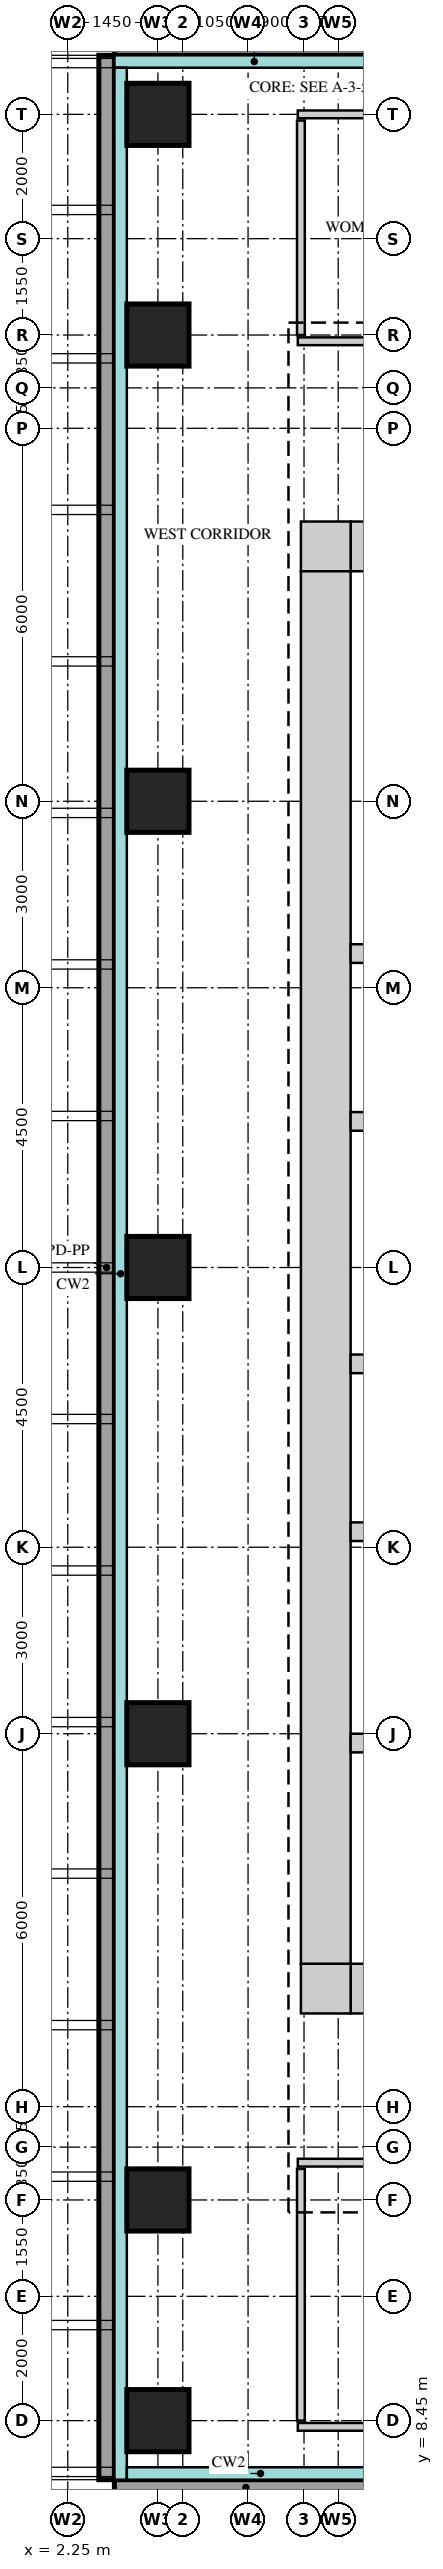
"""IFC4 building model, lengths in metres.
Left out: names, types, materials, properties, quantities, classifications, styles, units other than length and angle.
Written with IfcOpenShell. Run it as: python <this file> out.ifc"""

import sys

from ifc_helpers import new_model, si_unit, direction, frame, frame_2d, origin, origin_2d, place, context, subcontext, project, spatial, rectangle, extrude, source, transform, mapped, element, save


model = new_model("IFC4")
c1 = context("Model", 3, precision=1e-05, world=origin(), true_north=direction((0.0, 1.0)))
c2 = subcontext(c1, "Body", "Model", "MODEL_VIEW")
j1 = project(units=[si_unit("LENGTHUNIT", "METRE"), si_unit("PLANEANGLEUNIT", "RADIAN")], contexts=[c1])
p1 = place(None, origin())
s1 = spatial("IfcSite", under=j1, at=p1, CompositionType="ELEMENT")
p2 = place(p1, origin())
s2 = spatial("IfcBuilding", under=s1, at=p2, CompositionType="ELEMENT")
p3 = place(p2, frame((0.0, 0.0, 164.7)))
s3 = spatial("IfcBuildingStorey", under=s2, at=p3, CompositionType="ELEMENT", Elevation=164.7)
m1 = source(origin(), c2, "Body", "SweptSolid", [
    extrude(rectangle(XDim=13.4, YDim=0.8, at=frame_2d((6.7, 0.0))), origin(), (0.0, 0.0, 1.0), 3.75),
])
p4 = place(p3, frame((6.8, 38.6, 0.0), z_axis=(0.0, 0.0, 1.0), x_axis=(1.0, 0.0, 0.0)))
e1 = element("IfcWall", 1, at=p4, inside=s3, PredefinedType="SHEAR", context=c2, shape_type="MappedRepresentation", body=[
    mapped(m1, transform((0.0, 0.0, 0.0))),
])
m2 = source(origin(), c2, "Body", "SweptSolid", [
    extrude(rectangle(XDim=0.9, YDim=2.1, at=frame_2d((0.45, 1.05))), frame((0.0, 0.41, 0.0), z_axis=(0.0, -1.0, 0.0), x_axis=(1.0, 0.0, 0.0)), (0.0, 0.0, 1.0), 0.82),
])
p5 = place(p4, frame((2.9, 0.0, 0.0)))
e2 = element("IfcOpeningElement", 2, at=p5, cuts=e1, PredefinedType="OPENING", context=c2, shape_type="MappedRepresentation", body=[
    mapped(m2, transform((0.0, 0.0, 0.0))),
])
p6 = place(p4, frame((9.6, 0.0, 0.0)))
e3 = element("IfcOpeningElement", 3, at=p6, cuts=e1, PredefinedType="OPENING", context=c2, shape_type="MappedRepresentation", body=[
    mapped(m2, transform((0.0, 0.0, 0.0))),
])
m3 = source(origin(), c2, "Body", "SweptSolid", [
    extrude(rectangle(XDim=0.8, YDim=0.8, at=frame_2d((0.4, 0.0))), origin(), (0.0, 0.0, 1.0), 3.75),
])
p7 = place(p3, frame((6.0, 38.6, 0.0), z_axis=(0.0, 0.0, 1.0), x_axis=(1.0, 0.0, 0.0)))
e4 = element("IfcWall", 4, at=p7, inside=s3, PredefinedType="SHEAR", context=c2, shape_type="MappedRepresentation", body=[
    mapped(m3, transform((0.0, 0.0, 0.0))),
])
p8 = place(p3, frame((6.8, 15.4, 0.0), z_axis=(0.0, 0.0, 1.0), x_axis=(1.0, 0.0, 0.0)))
e5 = element("IfcWall", 5, at=p8, inside=s3, PredefinedType="SHEAR", context=c2, shape_type="MappedRepresentation", body=[
    mapped(m1, transform((0.0, 0.0, 0.0))),
])
m4 = source(origin(), c2, "Body", "SweptSolid", [
    extrude(rectangle(XDim=1.2, YDim=2.1, at=frame_2d((0.6, 1.05))), frame((0.0, 0.41, 0.0), z_axis=(0.0, -1.0, 0.0), x_axis=(1.0, 0.0, 0.0)), (0.0, 0.0, 1.0), 0.82),
])
p9 = place(p8, frame((5.4, 0.0, 0.0)))
e6 = element("IfcOpeningElement", 6, at=p9, cuts=e5, PredefinedType="OPENING", context=c2, shape_type="MappedRepresentation", body=[
    mapped(m4, transform((0.0, 0.0, 0.0))),
])
p10 = place(p8, frame((2.05, 0.0, 0.0)))
e7 = element("IfcOpeningElement", 7, at=p10, cuts=e5, PredefinedType="OPENING", context=c2, shape_type="MappedRepresentation", body=[
    mapped(m4, transform((0.0, 0.0, 0.0))),
])
m5 = source(origin(), c2, "Body", "SweptSolid", [
    extrude(rectangle(XDim=1.0, YDim=2.1, at=frame_2d((0.5, 1.05))), frame((0.0, 0.41, 0.0), z_axis=(0.0, -1.0, 0.0), x_axis=(1.0, 0.0, 0.0)), (0.0, 0.0, 1.0), 0.82),
])
p11 = place(p8, frame((7.9, 0.0, 0.0)))
e8 = element("IfcOpeningElement", 8, at=p11, cuts=e5, PredefinedType="OPENING", context=c2, shape_type="MappedRepresentation", body=[
    mapped(m5, transform((0.0, 0.0, 0.0))),
])
p12 = place(p3, frame((6.0, 15.4, 0.0), z_axis=(0.0, 0.0, 1.0), x_axis=(1.0, 0.0, 0.0)))
e9 = element("IfcWall", 9, at=p12, inside=s3, PredefinedType="SHEAR", context=c2, shape_type="MappedRepresentation", body=[
    mapped(m3, transform((0.0, 0.0, 0.0))),
])
m6 = source(origin(), c2, "Body", "SweptSolid", [
    extrude(rectangle(XDim=22.4, YDim=0.8, at=frame_2d((11.2, 0.0))), origin(), (0.0, 0.0, 1.0), 3.75),
])
p13 = place(p3, frame((6.4, 15.8, 0.0), z_axis=(0.0, 0.0, 1.0), x_axis=(0.0, 1.0, 0.0)))
e10 = element("IfcWall", 10, at=p13, inside=s3, PredefinedType="SHEAR", context=c2, shape_type="MappedRepresentation", body=[
    mapped(m6, transform((0.0, 0.0, 0.0))),
])
m7 = source(origin(), c2, "Body", "SweptSolid", [
    extrude(rectangle(XDim=13.4, YDim=0.3, at=frame_2d((6.7, 0.0))), origin(), (0.0, 0.0, 1.0), 3.75),
])
p14 = place(p3, frame((6.8, 22.75, 0.0), z_axis=(0.0, 0.0, 1.0), x_axis=(1.0, 0.0, 0.0)))
e11 = element("IfcWall", 11, at=p14, inside=s3, PredefinedType="STANDARD", context=c2, shape_type="MappedRepresentation", body=[
    mapped(m7, transform((0.0, 0.0, 0.0))),
])
m8 = source(origin(), c2, "Body", "SweptSolid", [
    extrude(rectangle(XDim=9.275, YDim=0.3, at=frame_2d((4.637, 0.0))), origin(), (0.0, 0.0, 1.0), 3.75),
])
p15 = place(p3, frame((6.8, 19.35, 0.0), z_axis=(0.0, 0.0, 1.0), x_axis=(1.0, 0.0, 0.0)))
e12 = element("IfcWall", 12, at=p15, inside=s3, PredefinedType="STANDARD", context=c2, shape_type="MappedRepresentation", body=[
    mapped(m8, transform((0.0, 0.0, 0.0))),
])
m9 = source(origin(), c2, "Body", "SweptSolid", [
    extrude(rectangle(XDim=1.2, YDim=2.1, at=frame_2d((0.6, 1.05))), frame((0.0, 0.16, 0.0), z_axis=(0.0, -1.0, 0.0), x_axis=(1.0, 0.0, 0.0)), (0.0, 0.0, 1.0), 0.32),
])
p16 = place(p15, frame((0.85, 0.0, 0.0)))
e13 = element("IfcOpeningElement", 13, at=p16, cuts=e12, PredefinedType="OPENING", context=c2, shape_type="MappedRepresentation", body=[
    mapped(m9, transform((0.0, 0.0, 0.0))),
])
p17 = place(p15, frame((3.2, 0.0, 0.0)))
e14 = element("IfcOpeningElement", 14, at=p17, cuts=e12, PredefinedType="OPENING", context=c2, shape_type="MappedRepresentation", body=[
    mapped(m9, transform((0.0, 0.0, 0.0))),
])
p18 = place(p15, frame((5.45, 0.0, 0.0)))
e15 = element("IfcOpeningElement", 15, at=p18, cuts=e12, PredefinedType="OPENING", context=c2, shape_type="MappedRepresentation", body=[
    mapped(m9, transform((0.0, 0.0, 0.0))),
])
p19 = place(p15, frame((7.6, 0.0, 0.0)))
e16 = element("IfcOpeningElement", 16, at=p19, cuts=e12, PredefinedType="OPENING", context=c2, shape_type="MappedRepresentation", body=[
    mapped(m9, transform((0.0, 0.0, 0.0))),
])
p20 = place(p3, frame((6.8, 32.05, 0.0), z_axis=(0.0, 0.0, 1.0), x_axis=(1.0, 0.0, 0.0)))
e17 = element("IfcWall", 17, at=p20, inside=s3, PredefinedType="STANDARD", context=c2, shape_type="MappedRepresentation", body=[
    mapped(m7, transform((0.0, 0.0, 0.0))),
])
p21 = place(p3, frame((6.8, 29.35, 0.0), z_axis=(0.0, 0.0, 1.0), x_axis=(1.0, 0.0, 0.0)))
e18 = element("IfcWall", 18, at=p21, inside=s3, PredefinedType="STANDARD", context=c2, shape_type="MappedRepresentation", body=[
    mapped(m7, transform((0.0, 0.0, 0.0))),
])
p22 = place(p21, frame((0.95, 0.0, 0.0)))
e19 = element("IfcOpeningElement", 19, at=p22, cuts=e18, PredefinedType="OPENING", context=c2, shape_type="MappedRepresentation", body=[
    mapped(m9, transform((0.0, 0.0, 0.0))),
])
p23 = place(p21, frame((3.5, 0.0, 0.0)))
e20 = element("IfcOpeningElement", 20, at=p23, cuts=e18, PredefinedType="OPENING", context=c2, shape_type="MappedRepresentation", body=[
    mapped(m9, transform((0.0, 0.0, 0.0))),
])
p24 = place(p21, frame((6.05, 0.0, 0.0)))
e21 = element("IfcOpeningElement", 21, at=p24, cuts=e18, PredefinedType="OPENING", context=c2, shape_type="MappedRepresentation", body=[
    mapped(m9, transform((0.0, 0.0, 0.0))),
])
p25 = place(p21, frame((8.6, 0.0, 0.0)))
e22 = element("IfcOpeningElement", 22, at=p25, cuts=e18, PredefinedType="OPENING", context=c2, shape_type="MappedRepresentation", body=[
    mapped(m9, transform((0.0, 0.0, 0.0))),
])
p26 = place(p21, frame((11.15, 0.0, 0.0)))
e23 = element("IfcOpeningElement", 23, at=p26, cuts=e18, PredefinedType="OPENING", context=c2, shape_type="MappedRepresentation", body=[
    mapped(m9, transform((0.0, 0.0, 0.0))),
])
p27 = place(p3, frame((6.8, 25.45, 0.0), z_axis=(0.0, 0.0, 1.0), x_axis=(1.0, 0.0, 0.0)))
e24 = element("IfcWall", 24, at=p27, inside=s3, PredefinedType="STANDARD", context=c2, shape_type="MappedRepresentation", body=[
    mapped(m7, transform((0.0, 0.0, 0.0))),
])
p28 = place(p27, frame((0.95, 0.0, 0.0)))
e25 = element("IfcOpeningElement", 25, at=p28, cuts=e24, PredefinedType="OPENING", context=c2, shape_type="MappedRepresentation", body=[
    mapped(m9, transform((0.0, 0.0, 0.0))),
])
p29 = place(p27, frame((3.5, 0.0, 0.0)))
e26 = element("IfcOpeningElement", 26, at=p29, cuts=e24, PredefinedType="OPENING", context=c2, shape_type="MappedRepresentation", body=[
    mapped(m9, transform((0.0, 0.0, 0.0))),
])
p30 = place(p27, frame((6.05, 0.0, 0.0)))
e27 = element("IfcOpeningElement", 27, at=p30, cuts=e24, PredefinedType="OPENING", context=c2, shape_type="MappedRepresentation", body=[
    mapped(m9, transform((0.0, 0.0, 0.0))),
])
p31 = place(p27, frame((8.6, 0.0, 0.0)))
e28 = element("IfcOpeningElement", 28, at=p31, cuts=e24, PredefinedType="OPENING", context=c2, shape_type="MappedRepresentation", body=[
    mapped(m9, transform((0.0, 0.0, 0.0))),
])
p32 = place(p27, frame((11.15, 0.0, 0.0)))
e29 = element("IfcOpeningElement", 29, at=p32, cuts=e24, PredefinedType="OPENING", context=c2, shape_type="MappedRepresentation", body=[
    mapped(m9, transform((0.0, 0.0, 0.0))),
])
m10 = source(origin(), c2, "Body", "SweptSolid", [
    extrude(rectangle(XDim=1.0, YDim=1.0, at=origin_2d()), origin(), (0.0, 0.0, 1.0), 3.75),
])
for number, where, z_axis, x_axis in (
    (30, (3.7, 8.45, 0.0), (0.0, 0.0, 1.0), (1.0, 0.0, 0.0)),
    (31, (3.7, 12.0, 0.0), (0.0, 0.0, 1.0), (1.0, 0.0, 0.0)),
    (32, (3.7, 19.5, 0.0), (0.0, 0.0, 1.0), (1.0, 0.0, 0.0)),
    (33, (3.7, 27.0, 0.0), (0.0, 0.0, 1.0), (1.0, 0.0, 0.0)),
    (34, (3.7, 34.5, 0.0), (0.0, 0.0, 1.0), (1.0, 0.0, 0.0)),
    (35, (3.7, 42.0, 0.0), (0.0, 0.0, 1.0), (1.0, 0.0, 0.0)),
    (36, (3.7, 45.55, 0.0), (0.0, 0.0, 1.0), (1.0, 0.0, 0.0)),
):
    element("IfcColumn", number, at=place(p3, frame(where, z_axis=z_axis, x_axis=x_axis)), inside=s3, PredefinedType="COLUMN", context=c2, shape_type="MappedRepresentation", body=[
        mapped(m10, transform((0.0, 0.0, 0.0))),
    ])
m11 = source(origin(), c2, "Body", "SweptSolid", [
    extrude(rectangle(XDim=4.23, YDim=0.25, at=frame_2d((2.115, 0.0))), origin(), (0.0, 0.0, 1.0), 1.1),
])
p33 = place(p3, frame((7.23, 7.375, 0.0), z_axis=(0.0, 0.0, 1.0), x_axis=(-1.0, 0.0, 0.0)))
e37 = element("IfcWall", 37, at=p33, inside=s3, PredefinedType="SOLIDWALL", context=c2, shape_type="MappedRepresentation", body=[
    mapped(m11, transform((0.0, 0.0, 0.0))),
])
m12 = source(origin(), c2, "Body", "SweptSolid", [
    extrude(rectangle(XDim=39.0, YDim=0.25, at=frame_2d((19.5, 0.0))), origin(), (0.0, 0.0, 1.0), 1.1),
])
p34 = place(p3, frame((2.875, 7.5, 0.0), z_axis=(0.0, 0.0, 1.0), x_axis=(0.0, 1.0, 0.0)))
e38 = element("IfcWall", 38, at=p34, inside=s3, PredefinedType="SOLIDWALL", context=c2, shape_type="MappedRepresentation", body=[
    mapped(m12, transform((0.0, 0.0, 0.0))),
])
m13 = source(origin(), c2, "Body", "SweptSolid", [
    extrude(rectangle(XDim=4.5, YDim=0.25, at=frame_2d((2.25, 0.0))), origin(), (0.0, 0.0, 1.0), 1.1),
])
p35 = place(p3, frame((3.0, 46.625, 0.0), z_axis=(0.0, 0.0, 1.0), x_axis=(1.0, 0.0, 0.0)))
e39 = element("IfcWall", 39, at=p35, inside=s3, PredefinedType="SOLIDWALL", context=c2, shape_type="MappedRepresentation", body=[
    mapped(m13, transform((0.0, 0.0, 0.0))),
])
m14 = source(origin(), c2, "Body", "SweptSolid", [
    extrude(rectangle(XDim=7.95, YDim=0.125, at=frame_2d((3.975, 0.0))), origin(), (0.0, 0.0, 1.0), 3.25),
])
p36 = place(p3, frame((5.95, 8.35, 0.0), z_axis=(0.0, 0.0, 1.0), x_axis=(1.0, 0.0, 0.0)))
e40 = element("IfcWall", 40, at=p36, inside=s3, PredefinedType="PARTITIONING", context=c2, shape_type="MappedRepresentation", body=[
    mapped(m14, transform((0.0, 0.0, 0.0))),
])
m15 = source(origin(), c2, "Body", "SweptSolid", [
    extrude(rectangle(XDim=0.9, YDim=2.1, at=frame_2d((0.45, 1.05))), frame((0.0, 0.073, 0.0), z_axis=(0.0, -1.0, 0.0), x_axis=(1.0, 0.0, 0.0)), (0.0, 0.0, 1.0), 0.145),
])
p37 = place(p36, frame((3.8, 0.0, 0.0)))
e41 = element("IfcOpeningElement", 41, at=p37, cuts=e40, PredefinedType="OPENING", context=c2, shape_type="MappedRepresentation", body=[
    mapped(m15, transform((0.0, 0.0, 0.0))),
])
m16 = source(origin(), c2, "Body", "SweptSolid", [
    extrude(rectangle(XDim=4.05, YDim=0.125, at=frame_2d((2.025, 0.0))), origin(), (0.0, 0.0, 1.0), 3.8),
])
p38 = place(p3, frame((6.0, 8.45, 0.0), z_axis=(0.0, 0.0, 1.0), x_axis=(0.0, 1.0, 0.0)))
e42 = element("IfcWall", 42, at=p38, inside=s3, PredefinedType="PARTITIONING", context=c2, shape_type="MappedRepresentation", body=[
    mapped(m16, transform((0.0, 0.0, 0.0))),
])
m17 = source(origin(), c2, "Body", "SweptSolid", [
    extrude(rectangle(XDim=8.0, YDim=0.125, at=frame_2d((4.0, 0.0))), origin(), (0.0, 0.0, 1.0), 3.8),
])
p39 = place(p3, frame((5.95, 12.6, 0.0), z_axis=(0.0, 0.0, 1.0), x_axis=(1.0, 0.0, 0.0)))
e43 = element("IfcWall", 43, at=p39, inside=s3, PredefinedType="PARTITIONING", context=c2, shape_type="MappedRepresentation", body=[
    mapped(m17, transform((0.0, 0.0, 0.0))),
])
m18 = source(origin(), c2, "Body", "SweptSolid", [
    extrude(rectangle(XDim=7.95, YDim=0.125, at=frame_2d((3.975, 0.0))), origin(), (0.0, 0.0, 1.0), 3.8),
])
p40 = place(p3, frame((5.95, 41.9, 0.0), z_axis=(0.0, 0.0, 1.0), x_axis=(1.0, 0.0, 0.0)))
e44 = element("IfcWall", 44, at=p40, inside=s3, PredefinedType="PARTITIONING", context=c2, shape_type="MappedRepresentation", body=[
    mapped(m18, transform((0.0, 0.0, 0.0))),
])
p41 = place(p40, frame((1.55, 0.0, 0.0)))
e45 = element("IfcOpeningElement", 45, at=p41, cuts=e44, PredefinedType="OPENING", context=c2, shape_type="MappedRepresentation", body=[
    mapped(m15, transform((0.0, 0.0, 0.0))),
])
p42 = place(p40, frame((5.65, 0.0, 0.0)))
e46 = element("IfcOpeningElement", 46, at=p42, cuts=e44, PredefinedType="OPENING", context=c2, shape_type="MappedRepresentation", body=[
    mapped(m15, transform((0.0, 0.0, 0.0))),
])
m19 = source(origin(), c2, "Body", "SweptSolid", [
    extrude(rectangle(XDim=3.45, YDim=0.125, at=frame_2d((1.725, 0.0))), origin(), (0.0, 0.0, 1.0), 3.8),
])
p43 = place(p3, frame((6.0, 42.0, 0.0), z_axis=(0.0, 0.0, 1.0), x_axis=(0.0, 1.0, 0.0)))
e47 = element("IfcWall", 47, at=p43, inside=s3, PredefinedType="PARTITIONING", context=c2, shape_type="MappedRepresentation", body=[
    mapped(m19, transform((0.0, 0.0, 0.0))),
])
p44 = place(p3, frame((5.95, 45.55, 0.0), z_axis=(0.0, 0.0, 1.0), x_axis=(1.0, 0.0, 0.0)))
e48 = element("IfcWall", 48, at=p44, inside=s3, PredefinedType="PARTITIONING", context=c2, shape_type="MappedRepresentation", body=[
    mapped(m14, transform((0.0, 0.0, 0.0))),
])
save(model, sys.argv[1])
